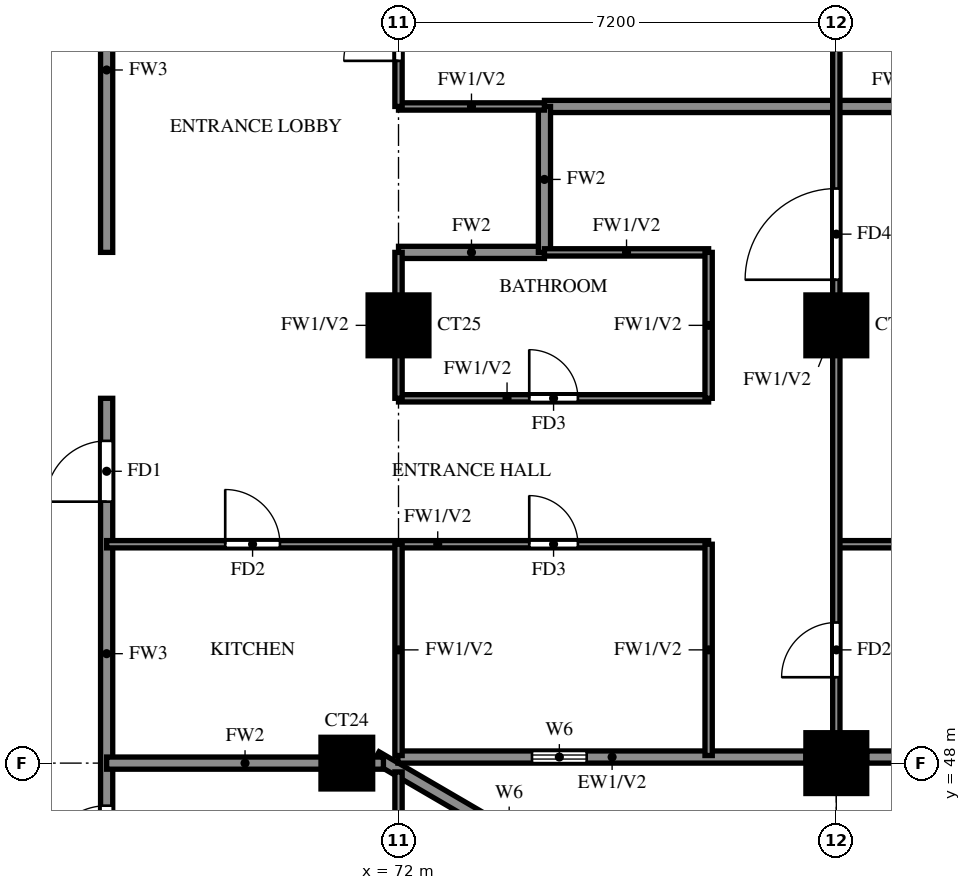
"""IFC4 building model, lengths in metres.
Left out: names, types, materials, properties, quantities, classifications, styles, units other than length and angle.
Written with IfcOpenShell. Run it as: python <this file> out.ifc"""

import sys

from ifc_helpers import new_model, si_unit, direction, frame, frame_2d, origin, origin_2d, place, context, subcontext, project, spatial, rectangle, extrude, source, transform, mapped, element, fill, save


model = new_model("IFC4")
c1 = context("Model", 3, precision=1e-05, world=origin(), true_north=direction((0.0, 1.0)))
c2 = subcontext(c1, "Body", "Model", "MODEL_VIEW")
j1 = project(units=[si_unit("LENGTHUNIT", "METRE"), si_unit("PLANEANGLEUNIT", "RADIAN")], contexts=[c1])
p1 = place(None, origin())
s1 = spatial("IfcSite", under=j1, at=p1, CompositionType="ELEMENT")
p2 = place(p1, origin())
s2 = spatial("IfcBuilding", under=s1, at=p2, CompositionType="ELEMENT")
p3 = place(p2, frame((0.0, 0.0, 150.0)))
s3 = spatial("IfcBuildingStorey", under=s2, at=p3, CompositionType="ELEMENT", Elevation=150.0)
m1 = source(origin(), c2, "Body", "SweptSolid", [
    extrude(rectangle(XDim=0.85, YDim=0.85, at=origin_2d()), origin(), (0.0, 0.0, 1.0), 3.2),
])
p4 = place(p3, frame((71.15, 48.0, 0.0), z_axis=(0.0, 0.0, 1.0), x_axis=(1.0, 0.0, 0.0)))
e1 = element("IfcColumn", 1, at=p4, inside=s3, PredefinedType="COLUMN", context=c2, shape_type="MappedRepresentation", body=[
    mapped(m1, transform((0.0, 0.0, 0.0))),
])
m2 = source(origin(), c2, "Body", "SweptSolid", [
    extrude(rectangle(XDim=1.0, YDim=1.0, at=origin_2d()), origin(), (0.0, 0.0, 1.0), 3.2),
])
for number, where, z_axis, x_axis in (
    (2, (79.2, 48.0, 0.0), (0.0, 0.0, 1.0), (1.0, 0.0, 0.0)),
    (3, (72.0, 55.2, 0.0), (0.0, 0.0, 1.0), (1.0, 0.0, 0.0)),
    (4, (79.2, 55.2, 0.0), (0.0, 0.0, 1.0), (1.0, 0.0, 0.0)),
):
    element("IfcColumn", number, at=place(p3, frame(where, z_axis=z_axis, x_axis=x_axis)), inside=s3, PredefinedType="COLUMN", context=c2, shape_type="MappedRepresentation", body=[
        mapped(m2, transform((0.0, 0.0, 0.0))),
    ])
p5 = place(p3, frame((85.719, 39.881, 0.0), z_axis=(0.0, 0.0, 1.0), x_axis=(-0.86377618652, 0.503875678716, 0.0)))
e5 = element("IfcWall", 5, at=p5, inside=s3, PredefinedType="SOLIDWALL", context=c2, shape_type="SweptSolid", body=[
    extrude(rectangle(XDim=16.311, YDim=0.2, at=frame_2d((8.156, 0.0))), origin(), (0.0, 0.0, 1.0), 3.2),
])
p6 = place(p5, frame((13.326, 0.0, 1.5)))
e6 = element("IfcOpeningElement", 6, at=p6, cuts=e5, PredefinedType="OPENING", context=c2, shape_type="SweptSolid", body=[
    extrude(rectangle(XDim=0.9, YDim=0.9, at=frame_2d((0.45, 0.45))), frame((0.0, 0.11, 0.0), z_axis=(0.0, -1.0, 0.0), x_axis=(1.0, 0.0, 0.0)), (0.0, 0.0, 1.0), 0.22),
])
p7 = place(p3, frame((71.99, 48.1, 0.0), z_axis=(0.0, 0.0, 1.0), x_axis=(1.0, 0.0, 0.0)))
e7 = element("IfcWall", 7, at=p7, inside=s3, PredefinedType="SOLIDWALL", context=c2, shape_type="SweptSolid", body=[
    extrude(rectangle(XDim=6.71, YDim=0.2, at=frame_2d((3.355, 0.0))), origin(), (0.0, 0.0, 1.0), 3.2),
])
p8 = place(p7, frame((2.205, 0.0, 1.5)))
e8 = element("IfcOpeningElement", 8, at=p8, cuts=e7, PredefinedType="OPENING", context=c2, shape_type="SweptSolid", body=[
    extrude(rectangle(XDim=0.9, YDim=0.9, at=frame_2d((0.45, 0.45))), frame((0.0, 0.11, 0.0), z_axis=(0.0, -1.0, 0.0), x_axis=(1.0, 0.0, 0.0)), (0.0, 0.0, 1.0), 0.22),
])
p9 = place(p3, frame((79.7, 48.1, 0.0), z_axis=(0.0, 0.0, 1.0), x_axis=(1.0, 0.0, 0.0)))
e9 = element("IfcWall", 9, at=p9, inside=s3, PredefinedType="SOLIDWALL", context=c2, shape_type="SweptSolid", body=[
    extrude(rectangle(XDim=5.675, YDim=0.2, at=frame_2d((2.837, 0.0))), origin(), (0.0, 0.0, 1.0), 3.2),
])
p10 = place(p9, frame((1.637, 0.0, 0.6)))
e10 = element("IfcOpeningElement", 10, at=p10, cuts=e9, PredefinedType="OPENING", context=c2, shape_type="SweptSolid", body=[
    extrude(rectangle(XDim=2.4, YDim=2.4, at=frame_2d((1.2, 1.2))), frame((0.0, 0.11, 0.0), z_axis=(0.0, -1.0, 0.0), x_axis=(1.0, 0.0, 0.0)), (0.0, 0.0, 1.0), 0.22),
])
p11 = place(p3, frame((67.2, 45.6, 0.0), z_axis=(0.0, 0.0, 1.0), x_axis=(0.0, 1.0, 0.0)))
e11 = element("IfcWall", 11, at=p11, inside=s3, PredefinedType="SOLIDWALL", context=c2, shape_type="SweptSolid", body=[
    extrude(rectangle(XDim=8.4, YDim=0.2, at=frame_2d((4.2, 0.0))), origin(), (0.0, 0.0, 1.0), 3.2),
])
p12 = place(p11, frame((6.7, 0.0, 0.0)))
e12 = element("IfcOpeningElement", 12, at=p12, cuts=e11, PredefinedType="OPENING", context=c2, shape_type="SweptSolid", body=[
    extrude(rectangle(XDim=1.0, YDim=2.1, at=frame_2d((0.5, 1.05))), frame((0.0, 0.11, 0.0), z_axis=(0.0, -1.0, 0.0), x_axis=(1.0, 0.0, 0.0)), (0.0, 0.0, 1.0), 0.22),
])
p13 = place(p11, frame((0.7, 0.0, 0.0)))
e13 = element("IfcOpeningElement", 13, at=p13, cuts=e11, PredefinedType="OPENING", context=c2, shape_type="SweptSolid", body=[
    extrude(rectangle(XDim=1.0, YDim=2.1, at=frame_2d((0.5, 1.05))), frame((0.0, 0.11, 0.0), z_axis=(0.0, -1.0, 0.0), x_axis=(1.0, 0.0, 0.0)), (0.0, 0.0, 1.0), 0.22),
])
p14 = place(p3, frame((67.2, 56.4, 0.0), z_axis=(0.0, 0.0, 1.0), x_axis=(0.0, 1.0, 0.0)))
e14 = element("IfcWall", 14, at=p14, inside=s3, PredefinedType="SOLIDWALL", context=c2, shape_type="SweptSolid", body=[
    extrude(rectangle(XDim=6.0, YDim=0.2, at=frame_2d((3.0, 0.0))), origin(), (0.0, 0.0, 1.0), 3.2),
])
p15 = place(p14, frame((3.7, 0.0, 0.0)))
e15 = element("IfcOpeningElement", 15, at=p15, cuts=e14, PredefinedType="OPENING", context=c2, shape_type="SweptSolid", body=[
    extrude(rectangle(XDim=1.0, YDim=2.1, at=frame_2d((0.5, 1.05))), frame((0.0, 0.11, 0.0), z_axis=(0.0, -1.0, 0.0), x_axis=(1.0, 0.0, 0.0)), (0.0, 0.0, 1.0), 0.22),
])
p16 = place(p3, frame((67.2, 48.0, 0.0), z_axis=(0.0, 0.0, 1.0), x_axis=(1.0, 0.0, 0.0)))
e16 = element("IfcWall", 16, at=p16, inside=s3, PredefinedType="SOLIDWALL", context=c2, shape_type="SweptSolid", body=[
    extrude(rectangle(XDim=4.552, YDim=0.2, at=frame_2d((2.276, 0.0))), origin(), (0.0, 0.0, 1.0), 3.2),
])
p17 = place(p3, frame((72.0, 56.4, 0.0), z_axis=(0.0, 0.0, 1.0), x_axis=(1.0, 0.0, 0.0)))
e17 = element("IfcWall", 17, at=p17, inside=s3, PredefinedType="SOLIDWALL", context=c2, shape_type="SweptSolid", body=[
    extrude(rectangle(XDim=2.4, YDim=0.2, at=frame_2d((1.2, 0.0))), origin(), (0.0, 0.0, 1.0), 3.2),
])
p18 = place(p3, frame((74.4, 58.8, 0.0), z_axis=(0.0, 0.0, 1.0), x_axis=(1.0, 0.0, 0.0)))
e18 = element("IfcWall", 18, at=p18, inside=s3, PredefinedType="SOLIDWALL", context=c2, shape_type="SweptSolid", body=[
    extrude(rectangle(XDim=11.875, YDim=0.2, at=frame_2d((5.938, 0.0))), origin(), (0.0, 0.0, 1.0), 2.3),
])
p19 = place(p3, frame((74.4, 56.4, 0.0), z_axis=(0.0, 0.0, 1.0), x_axis=(0.0, 1.0, 0.0)))
e19 = element("IfcWall", 19, at=p19, inside=s3, PredefinedType="SOLIDWALL", context=c2, shape_type="SweptSolid", body=[
    extrude(rectangle(XDim=2.4, YDim=0.2, at=frame_2d((1.2, 0.0))), origin(), (0.0, 0.0, 1.0), 3.2),
])
p20 = place(p3, frame((67.2, 51.6, 0.0), z_axis=(0.0, 0.0, 1.0), x_axis=(1.0, 0.0, 0.0)))
e20 = element("IfcWall", 20, at=p20, inside=s3, PredefinedType="PARTITIONING", context=c2, shape_type="SweptSolid", body=[
    extrude(rectangle(XDim=9.9, YDim=0.12, at=frame_2d((4.95, 0.0))), origin(), (0.0, 0.0, 1.0), 3.2),
])
p21 = place(p20, frame((6.95, 0.0, 0.0)))
e21 = element("IfcOpeningElement", 21, at=p21, cuts=e20, PredefinedType="OPENING", context=c2, shape_type="SweptSolid", body=[
    extrude(rectangle(XDim=0.8, YDim=2.1, at=frame_2d((0.4, 1.05))), frame((0.0, 0.07, 0.0), z_axis=(0.0, -1.0, 0.0), x_axis=(1.0, 0.0, 0.0)), (0.0, 0.0, 1.0), 0.14),
])
p22 = place(p20, frame((1.95, 0.0, 0.0)))
e22 = element("IfcOpeningElement", 22, at=p22, cuts=e20, PredefinedType="OPENING", context=c2, shape_type="SweptSolid", body=[
    extrude(rectangle(XDim=0.9, YDim=2.1, at=frame_2d((0.45, 1.05))), frame((0.0, 0.07, 0.0), z_axis=(0.0, -1.0, 0.0), x_axis=(1.0, 0.0, 0.0)), (0.0, 0.0, 1.0), 0.14),
])
p23 = place(p3, frame((79.2, 51.6, 0.0), z_axis=(0.0, 0.0, 1.0), x_axis=(1.0, 0.0, 0.0)))
e23 = element("IfcWall", 23, at=p23, inside=s3, PredefinedType="PARTITIONING", context=c2, shape_type="SweptSolid", body=[
    extrude(rectangle(XDim=7.075, YDim=0.12, at=frame_2d((3.538, 0.0))), origin(), (0.0, 0.0, 1.0), 2.3),
])
p24 = place(p3, frame((72.0, 54.0, 0.0), z_axis=(0.0, 0.0, 1.0), x_axis=(1.0, 0.0, 0.0)))
e24 = element("IfcWall", 24, at=p24, inside=s3, PredefinedType="PARTITIONING", context=c2, shape_type="SweptSolid", body=[
    extrude(rectangle(XDim=5.1, YDim=0.12, at=frame_2d((2.55, 0.0))), origin(), (0.0, 0.0, 1.0), 3.2),
])
p25 = place(p24, frame((2.15, 0.0, 0.0)))
e25 = element("IfcOpeningElement", 25, at=p25, cuts=e24, PredefinedType="OPENING", context=c2, shape_type="SweptSolid", body=[
    extrude(rectangle(XDim=0.8, YDim=2.1, at=frame_2d((0.4, 1.05))), frame((0.0, 0.07, 0.0), z_axis=(0.0, -1.0, 0.0), x_axis=(1.0, 0.0, 0.0)), (0.0, 0.0, 1.0), 0.14),
])
p26 = place(p3, frame((74.4, 56.4, 0.0), z_axis=(0.0, 0.0, 1.0), x_axis=(1.0, 0.0, 0.0)))
e26 = element("IfcWall", 26, at=p26, inside=s3, PredefinedType="PARTITIONING", context=c2, shape_type="SweptSolid", body=[
    extrude(rectangle(XDim=2.7, YDim=0.12, at=frame_2d((1.35, 0.0))), origin(), (0.0, 0.0, 1.0), 3.2),
])
p27 = place(p3, frame((72.0, 58.8, 0.0), z_axis=(0.0, 0.0, 1.0), x_axis=(1.0, 0.0, 0.0)))
e27 = element("IfcWall", 27, at=p27, inside=s3, PredefinedType="PARTITIONING", context=c2, shape_type="SweptSolid", body=[
    extrude(rectangle(XDim=2.4, YDim=0.12, at=frame_2d((1.2, 0.0))), origin(), (0.0, 0.0, 1.0), 3.2),
])
p28 = place(p3, frame((72.0, 39.725, 0.0), z_axis=(0.0, 0.0, 1.0), x_axis=(0.0, 1.0, 0.0)))
e28 = element("IfcWall", 28, at=p28, inside=s3, PredefinedType="PARTITIONING", context=c2, shape_type="SweptSolid", body=[
    extrude(rectangle(XDim=8.13, YDim=0.12, at=frame_2d((4.065, 0.0))), origin(), (0.0, 0.0, 1.0), 2.3),
])
p29 = place(p28, frame((1.788, 0.0, 0.0)))
e29 = element("IfcOpeningElement", 29, at=p29, cuts=e28, PredefinedType="OPENING", context=c2, shape_type="SweptSolid", body=[
    extrude(rectangle(XDim=1.5, YDim=2.1, at=frame_2d((0.75, 1.05))), frame((0.0, 0.07, 0.0), z_axis=(0.0, -1.0, 0.0), x_axis=(1.0, 0.0, 0.0)), (0.0, 0.0, 1.0), 0.14),
])
p30 = place(p28, frame((4.575, 0.0, 0.0)))
e30 = element("IfcOpeningElement", 30, at=p30, cuts=e28, PredefinedType="OPENING", context=c2, shape_type="SweptSolid", body=[
    extrude(rectangle(XDim=0.8, YDim=2.1, at=frame_2d((0.4, 1.05))), frame((0.0, 0.07, 0.0), z_axis=(0.0, -1.0, 0.0), x_axis=(1.0, 0.0, 0.0)), (0.0, 0.0, 1.0), 0.14),
])
p31 = place(p3, frame((72.0, 48.125, 0.0), z_axis=(0.0, 0.0, 1.0), x_axis=(0.0, 1.0, 0.0)))
e31 = element("IfcWall", 31, at=p31, inside=s3, PredefinedType="PARTITIONING", context=c2, shape_type="SweptSolid", body=[
    extrude(rectangle(XDim=3.475, YDim=0.12, at=frame_2d((1.738, 0.0))), origin(), (0.0, 0.0, 1.0), 3.2),
])
p32 = place(p3, frame((72.0, 54.0, 0.0), z_axis=(0.0, 0.0, 1.0), x_axis=(0.0, 1.0, 0.0)))
e32 = element("IfcWall", 32, at=p32, inside=s3, PredefinedType="PARTITIONING", context=c2, shape_type="SweptSolid", body=[
    extrude(rectangle(XDim=2.4, YDim=0.12, at=frame_2d((1.2, 0.0))), origin(), (0.0, 0.0, 1.0), 3.2),
])
p33 = place(p3, frame((72.0, 58.8, 0.0), z_axis=(0.0, 0.0, 1.0), x_axis=(0.0, 1.0, 0.0)))
e33 = element("IfcWall", 33, at=p33, inside=s3, PredefinedType="PARTITIONING", context=c2, shape_type="SweptSolid", body=[
    extrude(rectangle(XDim=3.6, YDim=0.12, at=frame_2d((1.8, 0.0))), origin(), (0.0, 0.0, 1.0), 3.2),
])
p34 = place(p33, frame((0.75, 0.0, 0.0)))
e34 = element("IfcOpeningElement", 34, at=p34, cuts=e33, PredefinedType="OPENING", context=c2, shape_type="SweptSolid", body=[
    extrude(rectangle(XDim=0.9, YDim=2.1, at=frame_2d((0.45, 1.05))), frame((0.0, 0.07, 0.0), z_axis=(0.0, -1.0, 0.0), x_axis=(1.0, 0.0, 0.0)), (0.0, 0.0, 1.0), 0.14),
])
p35 = place(p3, frame((77.1, 48.125, 0.0), z_axis=(0.0, 0.0, 1.0), x_axis=(0.0, 1.0, 0.0)))
e35 = element("IfcWall", 35, at=p35, inside=s3, PredefinedType="PARTITIONING", context=c2, shape_type="SweptSolid", body=[
    extrude(rectangle(XDim=3.475, YDim=0.12, at=frame_2d((1.738, 0.0))), origin(), (0.0, 0.0, 1.0), 3.2),
])
p36 = place(p3, frame((77.1, 54.0, 0.0), z_axis=(0.0, 0.0, 1.0), x_axis=(0.0, 1.0, 0.0)))
e36 = element("IfcWall", 36, at=p36, inside=s3, PredefinedType="PARTITIONING", context=c2, shape_type="SweptSolid", body=[
    extrude(rectangle(XDim=2.4, YDim=0.12, at=frame_2d((1.2, 0.0))), origin(), (0.0, 0.0, 1.0), 3.2),
])
p37 = place(p3, frame((79.2, 48.125, 0.0), z_axis=(0.0, 0.0, 1.0), x_axis=(0.0, 1.0, 0.0)))
e37 = element("IfcWall", 37, at=p37, inside=s3, PredefinedType="PARTITIONING", context=c2, shape_type="SweptSolid", body=[
    extrude(rectangle(XDim=14.275, YDim=0.12, at=frame_2d((7.137, 0.0))), origin(), (0.0, 0.0, 1.0), 3.2),
])
p38 = place(p37, frame((1.288, 0.0, 0.0)))
e38 = element("IfcOpeningElement", 38, at=p38, cuts=e37, PredefinedType="OPENING", context=c2, shape_type="SweptSolid", body=[
    extrude(rectangle(XDim=0.9, YDim=2.1, at=frame_2d((0.45, 1.05))), frame((0.0, 0.07, 0.0), z_axis=(0.0, -1.0, 0.0), x_axis=(1.0, 0.0, 0.0)), (0.0, 0.0, 1.0), 0.14),
])
p39 = place(p37, frame((7.825, 0.0, 0.0)))
e39 = element("IfcOpeningElement", 39, at=p39, cuts=e37, PredefinedType="OPENING", context=c2, shape_type="SweptSolid", body=[
    extrude(rectangle(XDim=1.5, YDim=2.1, at=frame_2d((0.75, 1.05))), frame((0.0, 0.07, 0.0), z_axis=(0.0, -1.0, 0.0), x_axis=(1.0, 0.0, 0.0)), (0.0, 0.0, 1.0), 0.14),
])
p40 = place(p37, frame((12.025, 0.0, 0.0)))
e40 = element("IfcOpeningElement", 40, at=p40, cuts=e37, PredefinedType="OPENING", context=c2, shape_type="SweptSolid", body=[
    extrude(rectangle(XDim=0.9, YDim=2.1, at=frame_2d((0.45, 1.05))), frame((0.0, 0.07, 0.0), z_axis=(0.0, -1.0, 0.0), x_axis=(1.0, 0.0, 0.0)), (0.0, 0.0, 1.0), 0.14),
])
p41 = place(p8, origin())
e41 = element("IfcWindow", 41, at=p41, inside=s3, PartitioningType="SINGLE_PANEL", PredefinedType="WINDOW", context=c2, shape_type="SweptSolid", body=[
    extrude(rectangle(XDim=0.9, YDim=0.9, at=frame_2d((0.45, 0.45))), frame((0.0, 0.03, 0.0), z_axis=(0.0, -1.0, 0.0), x_axis=(1.0, 0.0, 0.0)), (0.0, 0.0, 1.0), 0.06),
])
fill(e8, e41)
p42 = place(p12, origin())
e42 = element("IfcDoor", 42, at=p42, inside=s3, OperationType="SINGLE_SWING_RIGHT", PredefinedType="DOOR", context=c2, shape_type="SweptSolid", body=[
    extrude(rectangle(XDim=1.0, YDim=2.1, at=frame_2d((0.5, 1.05))), frame((0.0, 0.025, 0.0), z_axis=(0.0, -1.0, 0.0), x_axis=(1.0, 0.0, 0.0)), (0.0, 0.0, 1.0), 0.05),
])
fill(e12, e42)
p43 = place(p38, origin())
e43 = element("IfcDoor", 43, at=p43, inside=s3, OperationType="SINGLE_SWING_LEFT", PredefinedType="DOOR", context=c2, shape_type="SweptSolid", body=[
    extrude(rectangle(XDim=0.9, YDim=2.1, at=frame_2d((0.45, 1.05))), frame((0.0, 0.025, 0.0), z_axis=(0.0, -1.0, 0.0), x_axis=(1.0, 0.0, 0.0)), (0.0, 0.0, 1.0), 0.05),
])
fill(e38, e43)
p44 = place(p39, origin())
e44 = element("IfcDoor", 44, at=p44, inside=s3, OperationType="SINGLE_SWING_RIGHT", PredefinedType="DOOR", context=c2, shape_type="SweptSolid", body=[
    extrude(rectangle(XDim=1.5, YDim=2.1, at=frame_2d((0.75, 1.05))), frame((0.0, 0.025, 0.0), z_axis=(0.0, -1.0, 0.0), x_axis=(1.0, 0.0, 0.0)), (0.0, 0.0, 1.0), 0.05),
])
fill(e39, e44)
p45 = place(p21, origin())
e45 = element("IfcDoor", 45, at=p45, inside=s3, OperationType="SINGLE_SWING_RIGHT", PredefinedType="DOOR", context=c2, shape_type="SweptSolid", body=[
    extrude(rectangle(XDim=0.8, YDim=2.1, at=frame_2d((0.4, 1.05))), frame((0.0, 0.025, 0.0), z_axis=(0.0, -1.0, 0.0), x_axis=(1.0, 0.0, 0.0)), (0.0, 0.0, 1.0), 0.05),
])
fill(e21, e45)
p46 = place(p25, origin())
e46 = element("IfcDoor", 46, at=p46, inside=s3, OperationType="SINGLE_SWING_LEFT", PredefinedType="DOOR", context=c2, shape_type="SweptSolid", body=[
    extrude(rectangle(XDim=0.8, YDim=2.1, at=frame_2d((0.4, 1.05))), frame((0.0, 0.025, 0.0), z_axis=(0.0, -1.0, 0.0), x_axis=(1.0, 0.0, 0.0)), (0.0, 0.0, 1.0), 0.05),
])
fill(e25, e46)
p47 = place(p22, origin())
e47 = element("IfcDoor", 47, at=p47, inside=s3, OperationType="SINGLE_SWING_LEFT", PredefinedType="DOOR", context=c2, shape_type="SweptSolid", body=[
    extrude(rectangle(XDim=0.9, YDim=2.1, at=frame_2d((0.45, 1.05))), frame((0.0, 0.025, 0.0), z_axis=(0.0, -1.0, 0.0), x_axis=(1.0, 0.0, 0.0)), (0.0, 0.0, 1.0), 0.05),
])
fill(e22, e47)
p48 = place(p34, origin())
e48 = element("IfcDoor", 48, at=p48, inside=s3, OperationType="SINGLE_SWING_LEFT", PredefinedType="DOOR", context=c2, shape_type="SweptSolid", body=[
    extrude(rectangle(XDim=0.9, YDim=2.1, at=frame_2d((0.45, 1.05))), frame((0.0, 0.025, 0.0), z_axis=(0.0, -1.0, 0.0), x_axis=(1.0, 0.0, 0.0)), (0.0, 0.0, 1.0), 0.05),
])
fill(e34, e48)
p49 = place(p13, origin())
e49 = element("IfcDoor", 49, at=p49, inside=s3, OperationType="SINGLE_SWING_RIGHT", PredefinedType="DOOR", context=c2, shape_type="SweptSolid", body=[
    extrude(rectangle(XDim=1.0, YDim=2.1, at=frame_2d((0.5, 1.05))), frame((0.0, 0.025, 0.0), z_axis=(0.0, -1.0, 0.0), x_axis=(1.0, 0.0, 0.0)), (0.0, 0.0, 1.0), 0.05),
])
fill(e13, e49)
save(model, sys.argv[1])
